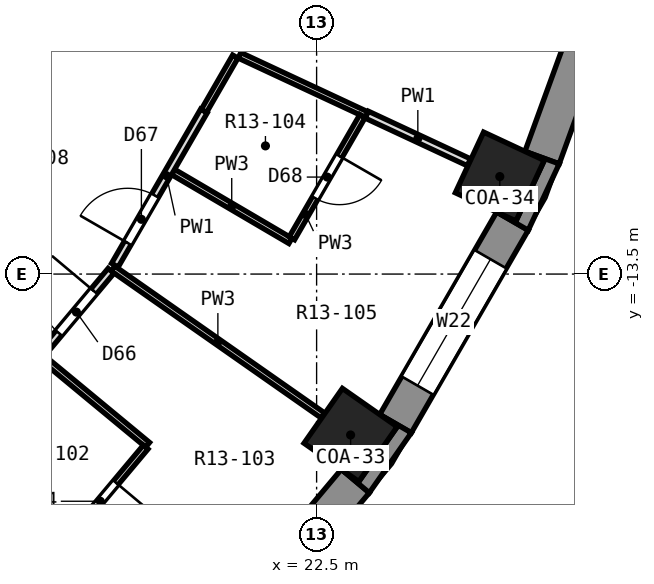
"""IFC4 building model, lengths in metres.
Left out: names, types, materials, properties, quantities, classifications, styles, units other than length and angle.
Written with IfcOpenShell. Run it as: python <this file> out.ifc"""

import sys

from ifc_helpers import new_model, si_unit, direction, frame, frame_2d, origin, origin_2d, place, context, subcontext, project, spatial, polyline, rectangle, outline, extrude, element, fill, save


model = new_model("IFC4")
c1 = context("Model", 3, precision=1e-05, world=origin(), true_north=direction((0.0, 1.0)))
c2 = subcontext(c1, "Body", "Model", "MODEL_VIEW")
j1 = project(units=[si_unit("LENGTHUNIT", "METRE"), si_unit("PLANEANGLEUNIT", "RADIAN")], contexts=[c1])
p1 = place(None, origin())
s1 = spatial("IfcSite", under=j1, at=p1, CompositionType="ELEMENT")
p2 = place(p1, origin())
s2 = spatial("IfcBuilding", under=s1, at=p2, CompositionType="ELEMENT")
p3 = place(p2, frame((0.0, 0.0, 65.9)))
s3 = spatial("IfcBuildingStorey", under=s2, at=p3, CompositionType="ELEMENT", Elevation=65.9)
for number, where, z_axis, x_axis in (
    (1, (23.059, -16.146, 0.0), (0.0, 0.0, 1.0), (0.819, -0.574, 0.0)),
    (2, (25.512, -11.897, 0.0), (0.0, 0.0, 1.0), (0.906, -0.423, 0.0)),
):
    element("IfcColumn", number, at=place(p3, frame(where, z_axis=z_axis, x_axis=x_axis)), inside=s3, PredefinedType="COLUMN", context=c2, shape_type="SweptSolid", body=[
        extrude(rectangle(XDim=1.1, YDim=1.1, at=origin_2d()), origin(), (0.0, 0.0, 1.0), 3.3),
    ])
p4 = place(p3, frame((20.665, -19.85, 0.0), z_axis=(0.0, 0.0, 1.0), x_axis=(0.642809392687, 0.766026164483, 0.0)))
e3 = element("IfcWall", 3, at=p4, inside=s3, PredefinedType="SOLIDWALL", context=c2, shape_type="SweptSolid", body=[
    extrude(rectangle(XDim=3.846, YDim=0.6, at=frame_2d((1.923, 0.0))), origin(), (0.0, 0.0, 1.0), 2.75),
])
p5 = place(p4, frame((0.723, 0.0, 0.9)))
e4 = element("IfcOpeningElement", 4, at=p5, cuts=e3, PredefinedType="OPENING", context=c2, shape_type="SweptSolid", body=[
    extrude(rectangle(XDim=2.4, YDim=1.8, at=frame_2d((1.2, 0.9))), frame((0.0, 0.312, 0.0), z_axis=(0.0, -1.0, 0.0), x_axis=(1.0, 0.0, 0.0)), (0.0, 0.0, 1.0), 0.624),
])
p6 = place(p3, frame((23.798, -15.96, 0.0), z_axis=(0.0, 0.0, 1.0), x_axis=(0.499989888488, 0.86603124159, 0.0)))
e5 = element("IfcWall", 5, at=p6, inside=s3, PredefinedType="SOLIDWALL", context=c2, shape_type="SweptSolid", body=[
    extrude(rectangle(XDim=3.846, YDim=0.6, at=frame_2d((1.923, 0.0))), origin(), (0.0, 0.0, 1.0), 2.75),
])
p7 = place(p6, frame((0.723, 0.0, 0.9)))
e6 = element("IfcOpeningElement", 6, at=p7, cuts=e5, PredefinedType="OPENING", context=c2, shape_type="SweptSolid", body=[
    extrude(rectangle(XDim=2.4, YDim=1.8, at=frame_2d((1.2, 0.9))), frame((0.0, 0.312, 0.0), z_axis=(0.0, -1.0, 0.0), x_axis=(1.0, 0.0, 0.0)), (0.0, 0.0, 1.0), 0.624),
])
p8 = place(p3, frame((26.208, -11.585, 0.0), z_axis=(0.0, 0.0, 1.0), x_axis=(0.342028474173, 0.939689588564, 0.0)))
e7 = element("IfcWall", 7, at=p8, inside=s3, PredefinedType="SOLIDWALL", context=c2, shape_type="SweptSolid", body=[
    extrude(rectangle(XDim=3.846, YDim=0.6, at=frame_2d((1.923, 0.0))), origin(), (0.0, 0.0, 1.0), 2.75),
])
p9 = place(p3, origin())
e8 = element("IfcWall", 8, at=p9, inside=s3, PredefinedType="SOLIDWALL", context=c2, shape_type="SweptSolid", body=[
    extrude(outline(polyline([(23.367, -17.097), (24.058, -16.11), (23.538, -15.81), (23.825, -16.011), (23.194, -16.912), (22.907, -16.711), (23.367, -17.097)])), origin(), (0.0, 0.0, 1.0), 2.75),
])
p10 = place(p3, origin())
e9 = element("IfcWall", 9, at=p10, inside=s3, PredefinedType="SOLIDWALL", context=c2, shape_type="SweptSolid", body=[
    extrude(outline(polyline([(26.49, -11.688), (25.926, -11.483), (26.243, -11.631), (25.779, -12.628), (25.461, -12.479), (25.981, -12.78), (26.49, -11.688)])), origin(), (0.0, 0.0, 1.0), 2.75),
])
p11 = place(p3, frame((16.531, -16.531, 0.0), z_axis=(0.0, 0.0, 1.0), x_axis=(0.707106781187, -0.707106781187, 0.0)))
e10 = element("IfcWall", 10, at=p11, inside=s3, PredefinedType="PARTITIONING", context=c2, shape_type="SweptSolid", body=[
    extrude(rectangle(XDim=4.212, YDim=0.1, at=frame_2d((2.106, 0.0))), origin(), (0.0, 0.0, 1.0), 2.75),
])
p12 = place(p3, frame((17.997, -14.882, 0.0), z_axis=(0.0, 0.0, 1.0), x_axis=(0.770479328971, -0.637464982276, 0.0)))
e11 = element("IfcWall", 11, at=p12, inside=s3, PredefinedType="PARTITIONING", context=c2, shape_type="SweptSolid", body=[
    extrude(rectangle(XDim=2.237, YDim=0.1, at=frame_2d((1.119, 0.0))), origin(), (0.0, 0.0, 1.0), 2.75),
])
p13 = place(p3, frame((19.151, -13.409, 0.0), z_axis=(0.0, 0.0, 1.0), x_axis=(0.819242814206, -0.573446781639, 0.0)))
e12 = element("IfcWall", 12, at=p13, inside=s3, PredefinedType="PARTITIONING", context=c2, shape_type="SweptSolid", body=[
    extrude(rectangle(XDim=4.211, YDim=0.1, at=frame_2d((2.106, 0.0))), origin(), (0.0, 0.0, 1.0), 2.75),
])
p14 = place(p3, frame((20.14, -11.822, 0.0), z_axis=(0.0, 0.0, 1.0), x_axis=(0.862374352329, -0.506271149134, 0.0)))
e13 = element("IfcWall", 13, at=p14, inside=s3, PredefinedType="PARTITIONING", context=c2, shape_type="SweptSolid", body=[
    extrude(rectangle(XDim=2.237, YDim=0.1, at=frame_2d((1.119, 0.0))), origin(), (0.0, 0.0, 1.0), 2.75),
])
p15 = place(p3, frame((21.232, -9.903, 0.0), z_axis=(0.0, 0.0, 1.0), x_axis=(0.906274952778, -0.422688667896, 0.0)))
e14 = element("IfcWall", 14, at=p15, inside=s3, PredefinedType="PARTITIONING", context=c2, shape_type="SweptSolid", body=[
    extrude(rectangle(XDim=2.309, YDim=0.1, at=frame_2d((1.155, 0.0))), origin(), (0.0, 0.0, 1.0), 2.75),
])
p16 = place(p3, frame((23.325, -10.879, 0.0), z_axis=(0.0, 0.0, 1.0), x_axis=(0.906348054162, -0.422531897869, 0.0)))
e15 = element("IfcWall", 15, at=p16, inside=s3, PredefinedType="PARTITIONING", context=c2, shape_type="SweptSolid", body=[
    extrude(rectangle(XDim=1.853, YDim=0.125, at=frame_2d((0.926, 0.0))), origin(), (0.0, 0.0, 1.0), 2.75),
])
p17 = place(p3, frame((18.196, -18.126, 0.0), z_axis=(0.0, 0.0, 1.0), x_axis=(0.642713765286, 0.766106399864, 0.0)))
e16 = element("IfcWall", 16, at=p17, inside=s3, PredefinedType="PARTITIONING", context=c2, shape_type="SweptSolid", body=[
    extrude(rectangle(XDim=2.323, YDim=0.1, at=frame_2d((1.161, 0.0))), origin(), (0.0, 0.0, 1.0), 2.75),
])
p18 = place(p17, frame((0.761, 0.0, 0.0)))
e17 = element("IfcOpeningElement", 17, at=p18, cuts=e16, PredefinedType="OPENING", context=c2, shape_type="SweptSolid", body=[
    extrude(rectangle(XDim=0.8, YDim=2.1, at=frame_2d((0.4, 1.05))), frame((0.0, 0.062, 0.0), z_axis=(0.0, -1.0, 0.0), x_axis=(1.0, 0.0, 0.0)), (0.0, 0.0, 1.0), 0.124),
])
p19 = place(p3, frame((17.573, -15.291, 0.0), z_axis=(0.0, 0.0, 1.0), x_axis=(0.642616104492, 0.766188320354, 0.0)))
e18 = element("IfcWall", 18, at=p19, inside=s3, PredefinedType="PARTITIONING", context=c2, shape_type="SweptSolid", body=[
    extrude(rectangle(XDim=2.406, YDim=0.125, at=frame_2d((1.203, 0.0))), origin(), (0.0, 0.0, 1.0), 2.75),
])
p20 = place(p19, frame((1.071, 0.0, 0.0)))
e19 = element("IfcOpeningElement", 19, at=p20, cuts=e18, PredefinedType="OPENING", context=c2, shape_type="SweptSolid", body=[
    extrude(rectangle(XDim=0.9, YDim=2.1, at=frame_2d((0.45, 1.05))), frame((0.0, 0.074, 0.0), z_axis=(0.0, -1.0, 0.0), x_axis=(1.0, 0.0, 0.0)), (0.0, 0.0, 1.0), 0.149),
])
p21 = place(p3, frame((22.094, -12.911, 0.0), z_axis=(0.0, 0.0, 1.0), x_axis=(0.500223263977, 0.865896463889, 0.0)))
e20 = element("IfcWall", 20, at=p21, inside=s3, PredefinedType="PARTITIONING", context=c2, shape_type="SweptSolid", body=[
    extrude(rectangle(XDim=2.321, YDim=0.1, at=frame_2d((1.16, 0.0))), origin(), (0.0, 0.0, 1.0), 2.75),
])
p22 = place(p21, frame((0.761, 0.0, 0.0)))
e21 = element("IfcOpeningElement", 21, at=p22, cuts=e20, PredefinedType="OPENING", context=c2, shape_type="SweptSolid", body=[
    extrude(rectangle(XDim=0.8, YDim=2.1, at=frame_2d((0.4, 1.05))), frame((0.0, 0.062, 0.0), z_axis=(0.0, -1.0, 0.0), x_axis=(1.0, 0.0, 0.0)), (0.0, 0.0, 1.0), 0.124),
])
p23 = place(p3, frame((20.646, -10.819, 0.0), z_axis=(0.0, 0.0, 1.0), x_axis=(0.499797427156, 0.866142327685, 0.0)))
e22 = element("IfcWall", 22, at=p23, inside=s3, PredefinedType="PARTITIONING", context=c2, shape_type="SweptSolid", body=[
    extrude(rectangle(XDim=1.034, YDim=0.1, at=frame_2d((0.517, 0.0))), origin(), (0.0, 0.0, 1.0), 2.75),
])
p24 = place(p3, frame((19.182, -13.355, 0.0), z_axis=(0.0, 0.0, 1.0), x_axis=(0.500092867575, 0.865971780025, 0.0)))
e23 = element("IfcWall", 23, at=p24, inside=s3, PredefinedType="PARTITIONING", context=c2, shape_type="SweptSolid", body=[
    extrude(rectangle(XDim=2.929, YDim=0.125, at=frame_2d((1.464, 0.0))), origin(), (0.0, 0.0, 1.0), 2.75),
])
p25 = place(p24, frame((0.422, 0.0, 0.0)))
e24 = element("IfcOpeningElement", 24, at=p25, cuts=e23, PredefinedType="OPENING", context=c2, shape_type="SweptSolid", body=[
    extrude(rectangle(XDim=0.9, YDim=2.1, at=frame_2d((0.45, 1.05))), frame((0.0, 0.074, 0.0), z_axis=(0.0, -1.0, 0.0), x_axis=(1.0, 0.0, 0.0)), (0.0, 0.0, 1.0), 0.149),
])
p26 = place(p7, origin())
e25 = element("IfcWindow", 25, at=p26, inside=s3, PartitioningType="SINGLE_PANEL", PredefinedType="WINDOW", context=c2, shape_type="SweptSolid", body=[
    extrude(rectangle(XDim=2.4, YDim=1.8, at=frame_2d((1.2, 0.9))), frame((0.0, 0.18, 0.0), z_axis=(0.0, -1.0, 0.0), x_axis=(1.0, 0.0, 0.0)), (0.0, 0.0, 1.0), 0.06),
])
fill(e6, e25)
p27 = place(p18, frame((0.8, 0.0, 0.0), z_axis=(0.0, 0.0, 1.0), x_axis=(-1.0, 0.0, 0.0)))
e26 = element("IfcDoor", 26, at=p27, inside=s3, OperationType="SINGLE_SWING_LEFT", PredefinedType="DOOR", context=c2, shape_type="SweptSolid", body=[
    extrude(rectangle(XDim=0.8, YDim=2.1, at=frame_2d((0.4, 1.05))), frame((0.0, 0.025, 0.0), z_axis=(0.0, -1.0, 0.0), x_axis=(1.0, 0.0, 0.0)), (0.0, 0.0, 1.0), 0.05),
])
fill(e17, e26)
p28 = place(p20, origin())
e27 = element("IfcDoor", 27, at=p28, inside=s3, OperationType="SINGLE_SWING_RIGHT", PredefinedType="DOOR", context=c2, shape_type="SweptSolid", body=[
    extrude(rectangle(XDim=0.9, YDim=2.1, at=frame_2d((0.45, 1.05))), frame((0.0, 0.025, 0.0), z_axis=(0.0, -1.0, 0.0), x_axis=(1.0, 0.0, 0.0)), (0.0, 0.0, 1.0), 0.05),
])
fill(e19, e27)
p29 = place(p25, origin())
e28 = element("IfcDoor", 28, at=p29, inside=s3, OperationType="SINGLE_SWING_LEFT", PredefinedType="DOOR", context=c2, shape_type="SweptSolid", body=[
    extrude(rectangle(XDim=0.9, YDim=2.1, at=frame_2d((0.45, 1.05))), frame((0.0, 0.025, 0.0), z_axis=(0.0, -1.0, 0.0), x_axis=(1.0, 0.0, 0.0)), (0.0, 0.0, 1.0), 0.05),
])
fill(e24, e28)
p30 = place(p22, frame((0.8, 0.0, 0.0), z_axis=(0.0, 0.0, 1.0), x_axis=(-1.0, 0.0, 0.0)))
e29 = element("IfcDoor", 29, at=p30, inside=s3, OperationType="SINGLE_SWING_LEFT", PredefinedType="DOOR", context=c2, shape_type="SweptSolid", body=[
    extrude(rectangle(XDim=0.8, YDim=2.1, at=frame_2d((0.4, 1.05))), frame((0.0, 0.025, 0.0), z_axis=(0.0, -1.0, 0.0), x_axis=(1.0, 0.0, 0.0)), (0.0, 0.0, 1.0), 0.05),
])
fill(e21, e29)
save(model, sys.argv[1])
